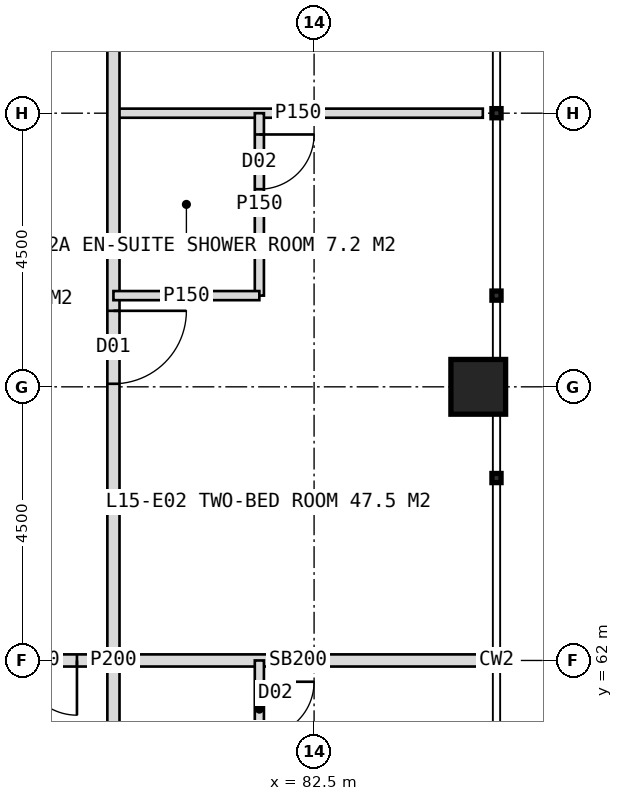
"""IFC4 building model, lengths in metres.
Left out: names, types, materials, properties, quantities, classifications, styles, units other than length and angle.
Written with IfcOpenShell. Run it as: python <this file> out.ifc"""

import sys

from ifc_helpers import new_model, si_unit, direction, frame, frame_2d, origin, origin_2d, place, context, subcontext, project, spatial, rectangle, hollow_rectangle, extrude, element, fill, save


model = new_model("IFC4")
c1 = context("Model", 3, precision=1e-05, world=origin(), true_north=direction((0.0, 1.0)))
c2 = subcontext(c1, "Body", "Model", "MODEL_VIEW")
j1 = project(units=[si_unit("LENGTHUNIT", "METRE"), si_unit("PLANEANGLEUNIT", "RADIAN")], contexts=[c1])
p1 = place(None, origin())
s1 = spatial("IfcSite", under=j1, at=p1, CompositionType="ELEMENT")
p2 = place(p1, origin())
s2 = spatial("IfcBuilding", under=s1, at=p2, CompositionType="ELEMENT")
p3 = place(p2, frame((0.0, 0.0, 67.0)))
s3 = spatial("IfcBuildingStorey", under=s2, at=p3, CompositionType="ELEMENT", Elevation=67.0)
p4 = place(p3, frame((85.2, 66.5, 0.0), z_axis=(0.0, 0.0, 1.0), x_axis=(1.0, 0.0, 0.0)))
e1 = element("IfcColumn", 1, at=p4, inside=s3, PredefinedType="COLUMN", context=c2, shape_type="SweptSolid", body=[
    extrude(hollow_rectangle(XDim=0.9, YDim=0.9, WallThickness=0.08, at=origin_2d()), origin(), (0.0, 0.0, 1.0), 4.0),
])
p5 = place(p3, frame((79.2, 71.0, 0.0), z_axis=(0.0, 0.0, 1.0), x_axis=(1.0, 0.0, 0.0)))
e2 = element("IfcWall", 2, at=p5, inside=s3, PredefinedType="PARTITIONING", context=c2, shape_type="SweptSolid", body=[
    extrude(rectangle(XDim=6.075, YDim=0.15, at=frame_2d((3.038, 0.0))), origin(), (0.0, 0.0, 1.0), 3.75),
])
p6 = place(p3, frame((79.2, 62.0, 0.0), z_axis=(0.0, 0.0, 1.0), x_axis=(1.0, 0.0, 0.0)))
e3 = element("IfcWall", 3, at=p6, inside=s3, PredefinedType="SOLIDWALL", context=c2, shape_type="SweptSolid", body=[
    extrude(rectangle(XDim=6.075, YDim=0.2, at=frame_2d((3.038, 0.0))), origin(), (0.0, 0.0, 1.0), 2.75),
])
p7 = place(p3, frame((79.2, 81.2, 0.0), z_axis=(0.0, 0.0, 1.0), x_axis=(0.0, -1.0, 0.0)))
e4 = element("IfcWall", 4, at=p7, inside=s3, PredefinedType="PARTITIONING", context=c2, shape_type="SweptSolid", body=[
    extrude(rectangle(XDim=38.4, YDim=0.2, at=frame_2d((19.2, 0.0))), origin(), (0.0, 0.0, 1.0), 3.75),
])
p8 = place(p7, frame((3.25, 0.0, 0.0)))
e5 = element("IfcOpeningElement", 5, at=p8, cuts=e4, PredefinedType="OPENING", context=c2, shape_type="SweptSolid", body=[
    extrude(rectangle(XDim=1.2, YDim=2.2, at=frame_2d((0.6, 1.1))), frame((0.0, 0.11, 0.0), z_axis=(0.0, -1.0, 0.0), x_axis=(1.0, 0.0, 0.0)), (0.0, 0.0, 1.0), 0.22),
])
p9 = place(p7, frame((13.45, 0.0, 0.0)))
e6 = element("IfcOpeningElement", 6, at=p9, cuts=e4, PredefinedType="OPENING", context=c2, shape_type="SweptSolid", body=[
    extrude(rectangle(XDim=1.2, YDim=2.2, at=frame_2d((0.6, 1.1))), frame((0.0, 0.11, 0.0), z_axis=(0.0, -1.0, 0.0), x_axis=(1.0, 0.0, 0.0)), (0.0, 0.0, 1.0), 0.22),
])
p10 = place(p7, frame((21.85, 0.0, 0.0)))
e7 = element("IfcOpeningElement", 7, at=p10, cuts=e4, PredefinedType="OPENING", context=c2, shape_type="SweptSolid", body=[
    extrude(rectangle(XDim=1.2, YDim=2.2, at=frame_2d((0.6, 1.1))), frame((0.0, 0.11, 0.0), z_axis=(0.0, -1.0, 0.0), x_axis=(1.0, 0.0, 0.0)), (0.0, 0.0, 1.0), 0.22),
])
p11 = place(p7, frame((27.85, 0.0, 0.0)))
e8 = element("IfcOpeningElement", 8, at=p11, cuts=e4, PredefinedType="OPENING", context=c2, shape_type="SweptSolid", body=[
    extrude(rectangle(XDim=1.2, YDim=2.2, at=frame_2d((0.6, 1.1))), frame((0.0, 0.11, 0.0), z_axis=(0.0, -1.0, 0.0), x_axis=(1.0, 0.0, 0.0)), (0.0, 0.0, 1.0), 0.22),
])
p12 = place(p3, frame((81.6, 71.0, 0.0), z_axis=(0.0, 0.0, 1.0), x_axis=(0.0, -1.0, 0.0)))
e9 = element("IfcWall", 9, at=p12, inside=s3, PredefinedType="PARTITIONING", context=c2, shape_type="SweptSolid", body=[
    extrude(rectangle(XDim=3.0, YDim=0.15, at=frame_2d((1.5, 0.0))), origin(), (0.0, 0.0, 1.0), 3.75),
])
p13 = place(p12, frame((0.35, 0.0, 0.0)))
e10 = element("IfcOpeningElement", 10, at=p13, cuts=e9, PredefinedType="OPENING", context=c2, shape_type="SweptSolid", body=[
    extrude(rectangle(XDim=0.9, YDim=2.1, at=frame_2d((0.45, 1.05))), frame((0.0, 0.085, 0.0), z_axis=(0.0, -1.0, 0.0), x_axis=(1.0, 0.0, 0.0)), (0.0, 0.0, 1.0), 0.17),
])
p14 = place(p3, frame((79.2, 68.0, 0.0), z_axis=(0.0, 0.0, 1.0), x_axis=(1.0, 0.0, 0.0)))
e11 = element("IfcWall", 11, at=p14, inside=s3, PredefinedType="PARTITIONING", context=c2, shape_type="SweptSolid", body=[
    extrude(rectangle(XDim=2.4, YDim=0.15, at=frame_2d((1.2, 0.0))), origin(), (0.0, 0.0, 1.0), 3.75),
])
p15 = place(p3, frame((81.6, 62.0, 0.0), z_axis=(0.0, 0.0, 1.0), x_axis=(0.0, -1.0, 0.0)))
e12 = element("IfcWall", 12, at=p15, inside=s3, PredefinedType="PARTITIONING", context=c2, shape_type="SweptSolid", body=[
    extrude(rectangle(XDim=2.4, YDim=0.15, at=frame_2d((1.2, 0.0))), origin(), (0.0, 0.0, 1.0), 3.75),
])
p16 = place(p15, frame((0.35, 0.0, 0.0)))
e13 = element("IfcOpeningElement", 13, at=p16, cuts=e12, PredefinedType="OPENING", context=c2, shape_type="SweptSolid", body=[
    extrude(rectangle(XDim=0.9, YDim=2.1, at=frame_2d((0.45, 1.05))), frame((0.0, 0.085, 0.0), z_axis=(0.0, -1.0, 0.0), x_axis=(1.0, 0.0, 0.0)), (0.0, 0.0, 1.0), 0.17),
])
p17 = place(p3, frame((76.5, 62.0, 0.0), z_axis=(0.0, 0.0, 1.0), x_axis=(1.0, 0.0, 0.0)))
e14 = element("IfcWall", 14, at=p17, inside=s3, PredefinedType="SOLIDWALL", context=c2, shape_type="SweptSolid", body=[
    extrude(rectangle(XDim=2.7, YDim=0.2, at=frame_2d((1.35, 0.0))), origin(), (0.0, 0.0, 1.0), 2.75),
])
p18 = place(p17, frame((0.3, 0.0, 0.0)))
e15 = element("IfcOpeningElement", 15, at=p18, cuts=e14, PredefinedType="OPENING", context=c2, shape_type="SweptSolid", body=[
    extrude(rectangle(XDim=1.8, YDim=2.2, at=frame_2d((0.9, 1.1))), frame((0.0, 0.11, 0.0), z_axis=(0.0, -1.0, 0.0), x_axis=(1.0, 0.0, 0.0)), (0.0, 0.0, 1.0), 0.22),
])
p19 = place(p9, origin())
e16 = element("IfcDoor", 16, at=p19, inside=s3, OperationType="SINGLE_SWING_LEFT", PredefinedType="DOOR", context=c2, shape_type="SweptSolid", body=[
    extrude(rectangle(XDim=1.2, YDim=2.2, at=frame_2d((0.6, 1.1))), frame((0.0, 0.025, 0.0), z_axis=(0.0, -1.0, 0.0), x_axis=(1.0, 0.0, 0.0)), (0.0, 0.0, 1.0), 0.05),
])
fill(e6, e16)
p20 = place(p13, origin())
e17 = element("IfcDoor", 17, at=p20, inside=s3, OperationType="SINGLE_SWING_LEFT", PredefinedType="DOOR", context=c2, shape_type="SweptSolid", body=[
    extrude(rectangle(XDim=0.9, YDim=2.1, at=frame_2d((0.45, 1.05))), frame((0.0, 0.025, 0.0), z_axis=(0.0, -1.0, 0.0), x_axis=(1.0, 0.0, 0.0)), (0.0, 0.0, 1.0), 0.05),
])
fill(e10, e17)
p21 = place(p16, origin())
e18 = element("IfcDoor", 18, at=p21, inside=s3, OperationType="SINGLE_SWING_LEFT", PredefinedType="DOOR", context=c2, shape_type="SweptSolid", body=[
    extrude(rectangle(XDim=0.9, YDim=2.1, at=frame_2d((0.45, 1.05))), frame((0.0, 0.025, 0.0), z_axis=(0.0, -1.0, 0.0), x_axis=(1.0, 0.0, 0.0)), (0.0, 0.0, 1.0), 0.05),
])
fill(e13, e18)
p22 = place(p18, origin())
e19 = element("IfcDoor", 19, at=p22, inside=s3, OperationType="DOUBLE_DOOR_DOUBLE_SWING", PredefinedType="DOOR", context=c2, shape_type="SweptSolid", body=[
    extrude(rectangle(XDim=1.8, YDim=2.2, at=frame_2d((0.9, 1.1))), frame((0.0, 0.025, 0.0), z_axis=(0.0, -1.0, 0.0), x_axis=(1.0, 0.0, 0.0)), (0.0, 0.0, 1.0), 0.05),
])
fill(e15, e19)
save(model, sys.argv[1])
